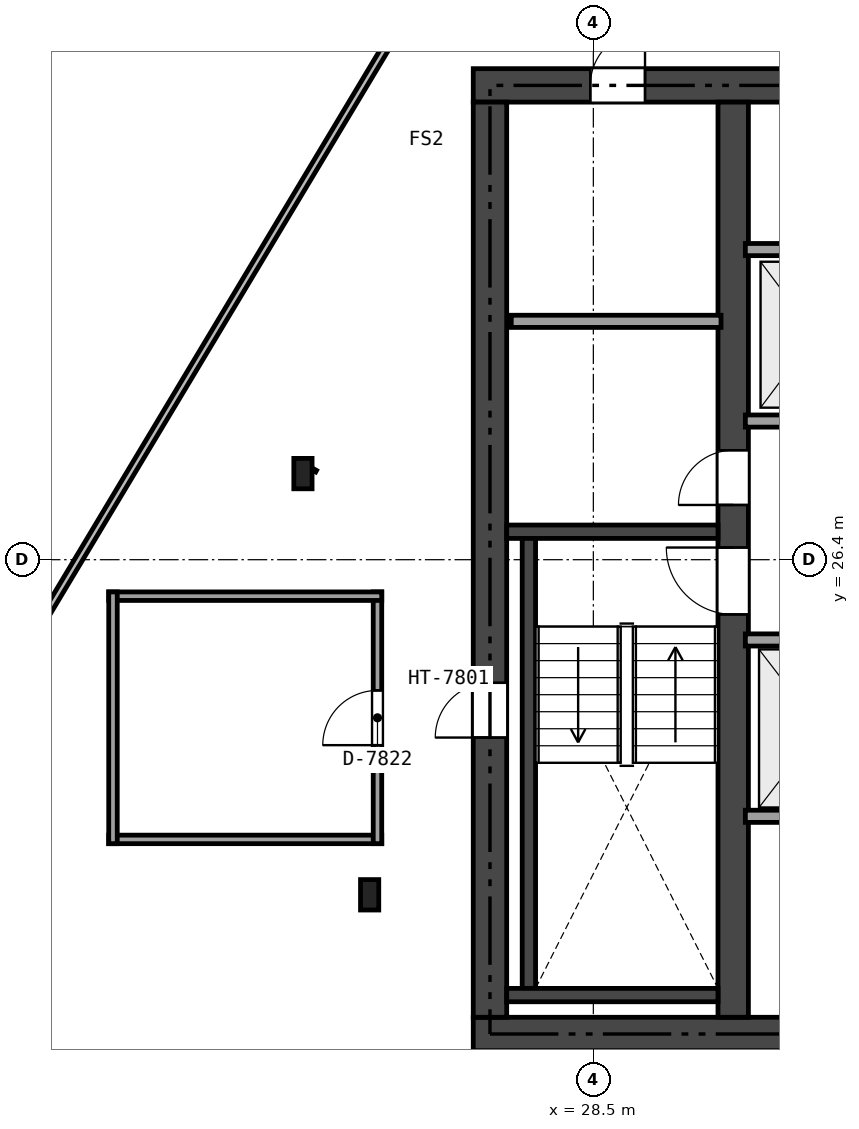
"""IFC4 building model, lengths in metres.
Left out: names, types, materials, properties, quantities, classifications, styles, units other than length and angle.
Written with IfcOpenShell. Run it as: python <this file> out.ifc"""

import sys

from ifc_helpers import new_model, si_unit, direction, frame, frame_2d, origin, origin_2d, place, context, subcontext, project, spatial, rectangle, i_section, extrude, element, fill, save


model = new_model("IFC4")
c1 = context("Model", 3, precision=1e-05, world=origin(), true_north=direction((0.0, 1.0)))
c2 = subcontext(c1, "Body", "Model", "MODEL_VIEW")
j1 = project(units=[si_unit("LENGTHUNIT", "METRE"), si_unit("PLANEANGLEUNIT", "RADIAN")], contexts=[c1])
p1 = place(None, origin())
s1 = spatial("IfcSite", under=j1, at=p1, CompositionType="ELEMENT")
p2 = place(p1, origin())
s2 = spatial("IfcBuilding", under=s1, at=p2, CompositionType="ELEMENT")
p3 = place(p2, frame((0.0, 0.0, 289.9)))
s3 = spatial("IfcBuildingStorey", under=s2, at=p3, CompositionType="ELEMENT", Elevation=289.9)
p4 = place(p3, frame((26.525, 18.6, 0.0), z_axis=(0.0, 0.0, 1.0), x_axis=(1.0, 0.0, 0.0)))
e1 = element("IfcWall", 1, at=p4, inside=s3, PredefinedType="SHEAR", context=c2, shape_type="SweptSolid", body=[
    extrude(rectangle(XDim=21.35, YDim=0.55, at=frame_2d((10.675, 0.0))), origin(), (0.0, 0.0, 1.0), 2.58),
])
p5 = place(p4, frame((12.4, 0.0, 0.0)))
e2 = element("IfcOpeningElement", 2, at=p5, cuts=e1, PredefinedType="OPENING", context=c2, shape_type="SweptSolid", body=[
    extrude(rectangle(XDim=1.15, YDim=2.15, at=frame_2d((0.575, 1.075))), frame((0.0, 0.285, 0.0), z_axis=(0.0, -1.0, 0.0), x_axis=(1.0, 0.0, 0.0)), (0.0, 0.0, 1.0), 0.57),
])
p6 = place(p4, frame((5.225, 0.0, 0.0)))
e3 = element("IfcOpeningElement", 3, at=p6, cuts=e1, PredefinedType="OPENING", context=c2, shape_type="SweptSolid", body=[
    extrude(rectangle(XDim=0.9, YDim=2.1, at=frame_2d((0.45, 1.05))), frame((0.0, 0.285, 0.0), z_axis=(0.0, -1.0, 0.0), x_axis=(1.0, 0.0, 0.0)), (0.0, 0.0, 1.0), 0.57),
])
p7 = place(p3, frame((26.525, 34.2, 0.0), z_axis=(0.0, 0.0, 1.0), x_axis=(1.0, 0.0, 0.0)))
e4 = element("IfcWall", 4, at=p7, inside=s3, PredefinedType="SHEAR", context=c2, shape_type="SweptSolid", body=[
    extrude(rectangle(XDim=21.35, YDim=0.55, at=frame_2d((10.675, 0.0))), origin(), (0.0, 0.0, 1.0), 2.58),
])
p8 = place(p7, frame((9.675, 0.0, 0.0)))
e5 = element("IfcOpeningElement", 5, at=p8, cuts=e4, PredefinedType="OPENING", context=c2, shape_type="SweptSolid", body=[
    extrude(rectangle(XDim=1.1, YDim=2.15, at=frame_2d((0.55, 1.075))), frame((0.0, 0.285, 0.0), z_axis=(0.0, -1.0, 0.0), x_axis=(1.0, 0.0, 0.0)), (0.0, 0.0, 1.0), 0.57),
])
p9 = place(p7, frame((1.925, 0.0, 0.0)))
e6 = element("IfcOpeningElement", 6, at=p9, cuts=e4, PredefinedType="OPENING", context=c2, shape_type="SweptSolid", body=[
    extrude(rectangle(XDim=0.9, YDim=2.1, at=frame_2d((0.45, 1.05))), frame((0.0, 0.285, 0.0), z_axis=(0.0, -1.0, 0.0), x_axis=(1.0, 0.0, 0.0)), (0.0, 0.0, 1.0), 0.57),
])
p10 = place(p7, frame((6.225, 0.0, 0.0)))
e7 = element("IfcOpeningElement", 7, at=p10, cuts=e4, PredefinedType="OPENING", context=c2, shape_type="SweptSolid", body=[
    extrude(rectangle(XDim=0.9, YDim=2.1, at=frame_2d((0.45, 1.05))), frame((0.0, 0.285, 0.0), z_axis=(0.0, -1.0, 0.0), x_axis=(1.0, 0.0, 0.0)), (0.0, 0.0, 1.0), 0.57),
])
p11 = place(p3, frame((26.8, 18.875, 0.0), z_axis=(0.0, 0.0, 1.0), x_axis=(0.0, 1.0, 0.0)))
e8 = element("IfcWall", 8, at=p11, inside=s3, PredefinedType="SHEAR", context=c2, shape_type="SweptSolid", body=[
    extrude(rectangle(XDim=15.05, YDim=0.55, at=frame_2d((7.525, 0.0))), origin(), (0.0, 0.0, 1.0), 2.58),
])
p12 = place(p11, frame((4.6, 0.0, 0.02)))
e9 = element("IfcOpeningElement", 9, at=p12, cuts=e8, PredefinedType="OPENING", context=c2, shape_type="SweptSolid", body=[
    extrude(rectangle(XDim=0.9, YDim=2.02, at=frame_2d((0.45, 1.01))), frame((0.0, 0.285, 0.0), z_axis=(0.0, -1.0, 0.0), x_axis=(1.0, 0.0, 0.0)), (0.0, 0.0, 1.0), 0.57),
])
p13 = place(p3, frame((30.8, 18.875, 0.0), z_axis=(0.0, 0.0, 1.0), x_axis=(0.0, 1.0, 0.0)))
e10 = element("IfcWall", 10, at=p13, inside=s3, PredefinedType="SHEAR", context=c2, shape_type="SweptSolid", body=[
    extrude(rectangle(XDim=15.05, YDim=0.5, at=frame_2d((7.525, 0.0))), origin(), (0.0, 0.0, 1.0), 2.58),
])
p14 = place(p13, frame((6.625, 0.0, 0.0)))
e11 = element("IfcOpeningElement", 11, at=p14, cuts=e10, PredefinedType="OPENING", context=c2, shape_type="SweptSolid", body=[
    extrude(rectangle(XDim=1.1, YDim=2.15, at=frame_2d((0.55, 1.075))), frame((0.0, 0.26, 0.0), z_axis=(0.0, -1.0, 0.0), x_axis=(1.0, 0.0, 0.0)), (0.0, 0.0, 1.0), 0.52),
])
p15 = place(p13, frame((8.425, 0.0, 0.0)))
e12 = element("IfcOpeningElement", 12, at=p15, cuts=e10, PredefinedType="OPENING", context=c2, shape_type="SweptSolid", body=[
    extrude(rectangle(XDim=0.9, YDim=2.1, at=frame_2d((0.45, 1.05))), frame((0.0, 0.26, 0.0), z_axis=(0.0, -1.0, 0.0), x_axis=(1.0, 0.0, 0.0)), (0.0, 0.0, 1.0), 0.52),
])
p16 = place(p3, frame((27.075, 26.86, 0.0), z_axis=(0.0, 0.0, 1.0), x_axis=(1.0, 0.0, 0.0)))
e13 = element("IfcWall", 13, at=p16, inside=s3, PredefinedType="SHEAR", context=c2, shape_type="SweptSolid", body=[
    extrude(rectangle(XDim=3.475, YDim=0.22, at=frame_2d((1.738, 0.0))), origin(), (0.0, 0.0, 1.0), 2.58),
])
p17 = place(p3, frame((27.44, 19.35, 0.0), z_axis=(0.0, 0.0, 1.0), x_axis=(0.0, 1.0, 0.0)))
e14 = element("IfcWall", 14, at=p17, inside=s3, PredefinedType="SHEAR", context=c2, shape_type="SweptSolid", body=[
    extrude(rectangle(XDim=7.4, YDim=0.22, at=frame_2d((3.7, 0.0))), origin(), (0.0, 0.0, 1.0), 2.58),
])
p18 = place(p3, frame((27.075, 19.24, 0.0), z_axis=(0.0, 0.0, 1.0), x_axis=(1.0, 0.0, 0.0)))
e15 = element("IfcWall", 15, at=p18, inside=s3, PredefinedType="SHEAR", context=c2, shape_type="SweptSolid", body=[
    extrude(rectangle(XDim=3.475, YDim=0.22, at=frame_2d((1.738, 0.0))), origin(), (0.0, 0.0, 1.0), 2.58),
])
for number, where, z_axis, x_axis in (
    (16, (23.724, 27.816, 0.0), (0.0, 0.0, 1.0), (1.0, 0.0, 0.0)),
    (17, (24.821, 20.889, 0.0), (0.0, 0.0, 1.0), (1.0, 0.0, 0.0)),
):
    element("IfcColumn", number, at=place(p3, frame(where, z_axis=z_axis, x_axis=x_axis)), inside=s3, PredefinedType="COLUMN", context=c2, shape_type="SweptSolid", body=[
        extrude(i_section(OverallWidth=0.3, OverallDepth=0.5, WebThickness=0.015, FlangeThickness=0.028, at=origin_2d()), origin(), (0.0, 0.0, 1.0), 2.58),
    ])
p19 = place(p3, frame((27.15, 30.32, 0.0), z_axis=(0.0, 0.0, 1.0), x_axis=(1.0, 0.0, 0.0)))
e18 = element("IfcWall", 18, at=p19, inside=s3, PredefinedType="SOLIDWALL", context=c2, shape_type="SweptSolid", body=[
    extrude(rectangle(XDim=3.45, YDim=0.2, at=frame_2d((1.725, 0.0))), origin(), (0.0, 0.0, 1.0), 2.58),
])
p20 = place(p3, frame((31.0, 28.68, 0.0), z_axis=(0.0, 0.0, 1.0), x_axis=(1.0, 0.0, 0.0)))
e19 = element("IfcWall", 19, at=p20, inside=s3, PredefinedType="SOLIDWALL", context=c2, shape_type="SweptSolid", body=[
    extrude(rectangle(XDim=4.42, YDim=0.2, at=frame_2d((2.21, 0.0))), origin(), (0.0, 0.0, 1.0), 2.58),
])
p21 = place(p20, frame((0.6, 0.0, 0.0)))
e20 = element("IfcOpeningElement", 20, at=p21, cuts=e19, PredefinedType="OPENING", context=c2, shape_type="SweptSolid", body=[
    extrude(rectangle(XDim=1.1, YDim=2.15, at=frame_2d((0.55, 1.075))), frame((0.0, 0.11, 0.0), z_axis=(0.0, -1.0, 0.0), x_axis=(1.0, 0.0, 0.0)), (0.0, 0.0, 1.0), 0.22),
])
p22 = place(p20, frame((2.85, 0.0, 0.0)))
e21 = element("IfcOpeningElement", 21, at=p22, cuts=e19, PredefinedType="OPENING", context=c2, shape_type="SweptSolid", body=[
    extrude(rectangle(XDim=1.1, YDim=2.15, at=frame_2d((0.55, 1.075))), frame((0.0, 0.11, 0.0), z_axis=(0.0, -1.0, 0.0), x_axis=(1.0, 0.0, 0.0)), (0.0, 0.0, 1.0), 0.22),
])
p23 = place(p3, frame((31.0, 31.5, 0.0), z_axis=(0.0, 0.0, 1.0), x_axis=(1.0, 0.0, 0.0)))
e22 = element("IfcWall", 22, at=p23, inside=s3, PredefinedType="SOLIDWALL", context=c2, shape_type="SweptSolid", body=[
    extrude(rectangle(XDim=4.42, YDim=0.2, at=frame_2d((2.21, 0.0))), origin(), (0.0, 0.0, 1.0), 2.58),
])
p24 = place(p3, frame((31.0, 25.08, 0.0), z_axis=(0.0, 0.0, 1.0), x_axis=(1.0, 0.0, 0.0)))
e23 = element("IfcWall", 23, at=p24, inside=s3, PredefinedType="SOLIDWALL", context=c2, shape_type="SweptSolid", body=[
    extrude(rectangle(XDim=4.42, YDim=0.2, at=frame_2d((2.21, 0.0))), origin(), (0.0, 0.0, 1.0), 2.58),
])
p25 = place(p24, frame((3.0, 0.0, 0.0)))
e24 = element("IfcOpeningElement", 24, at=p25, cuts=e23, PredefinedType="OPENING", context=c2, shape_type="SweptSolid", body=[
    extrude(rectangle(XDim=0.9, YDim=2.1, at=frame_2d((0.45, 1.05))), frame((0.0, 0.11, 0.0), z_axis=(0.0, -1.0, 0.0), x_axis=(1.0, 0.0, 0.0)), (0.0, 0.0, 1.0), 0.22),
])
p26 = place(p24, frame((0.62, 0.0, 0.0)))
e25 = element("IfcOpeningElement", 25, at=p26, cuts=e23, PredefinedType="OPENING", context=c2, shape_type="SweptSolid", body=[
    extrude(rectangle(XDim=1.2, YDim=2.15, at=frame_2d((0.6, 1.075))), frame((0.0, 0.11, 0.0), z_axis=(0.0, -1.0, 0.0), x_axis=(1.0, 0.0, 0.0)), (0.0, 0.0, 1.0), 0.22),
])
p27 = place(p3, frame((31.0, 22.18, 0.0), z_axis=(0.0, 0.0, 1.0), x_axis=(1.0, 0.0, 0.0)))
e26 = element("IfcWall", 26, at=p27, inside=s3, PredefinedType="SOLIDWALL", context=c2, shape_type="SweptSolid", body=[
    extrude(rectangle(XDim=2.42, YDim=0.2, at=frame_2d((1.21, 0.0))), origin(), (0.0, 0.0, 1.0), 2.58),
])
p28 = place(p3, frame((20.53, 21.8, 0.0), z_axis=(0.0, 0.0, 1.0), x_axis=(1.0, 0.0, 0.0)))
e27 = element("IfcWall", 27, at=p28, inside=s3, PredefinedType="PARTITIONING", context=c2, shape_type="SweptSolid", body=[
    extrude(rectangle(XDim=4.49, YDim=0.14, at=frame_2d((2.245, 0.0))), origin(), (0.0, 0.0, 1.0), 1.665),
])
p29 = place(p3, frame((24.95, 21.73, 0.0), z_axis=(0.0, 0.0, 1.0), x_axis=(0.0, 1.0, 0.0)))
e28 = element("IfcWall", 28, at=p29, inside=s3, PredefinedType="PARTITIONING", context=c2, shape_type="SweptSolid", body=[
    extrude(rectangle(XDim=4.14, YDim=0.14, at=frame_2d((2.07, 0.0))), origin(), (0.0, 0.0, 1.0), 2.58),
])
p30 = place(p29, frame((1.62, 0.0, 0.0)))
e29 = element("IfcOpeningElement", 29, at=p30, cuts=e28, PredefinedType="OPENING", context=c2, shape_type="SweptSolid", body=[
    extrude(rectangle(XDim=0.9, YDim=2.0, at=frame_2d((0.45, 1.0))), frame((0.0, 0.08, 0.0), z_axis=(0.0, -1.0, 0.0), x_axis=(1.0, 0.0, 0.0)), (0.0, 0.0, 1.0), 0.16),
])
p31 = place(p3, frame((25.02, 25.8, 0.0), z_axis=(0.0, 0.0, 1.0), x_axis=(-1.0, 0.0, 0.0)))
e30 = element("IfcWall", 30, at=p31, inside=s3, PredefinedType="PARTITIONING", context=c2, shape_type="SweptSolid", body=[
    extrude(rectangle(XDim=4.49, YDim=0.14, at=frame_2d((2.245, 0.0))), origin(), (0.0, 0.0, 1.0), 1.665),
])
p32 = place(p3, frame((20.6, 25.87, 0.0), z_axis=(0.0, 0.0, 1.0), x_axis=(0.0, -1.0, 0.0)))
e31 = element("IfcWall", 31, at=p32, inside=s3, PredefinedType="PARTITIONING", context=c2, shape_type="SweptSolid", body=[
    extrude(rectangle(XDim=4.14, YDim=0.14, at=frame_2d((2.07, 0.0))), origin(), (0.0, 0.0, 1.0), 2.58),
])
p33 = place(p12, origin())
e32 = element("IfcDoor", 32, at=p33, inside=s3, OperationType="SINGLE_SWING_LEFT", PredefinedType="TRAPDOOR", context=c2, shape_type="SweptSolid", body=[
    extrude(rectangle(XDim=0.9, YDim=2.02, at=frame_2d((0.45, 1.01))), frame((0.0, 0.025, 0.0), z_axis=(0.0, -1.0, 0.0), x_axis=(1.0, 0.0, 0.0)), (0.0, 0.0, 1.0), 0.05),
])
fill(e9, e32)
p34 = place(p14, origin())
e33 = element("IfcDoor", 33, at=p34, inside=s3, OperationType="SINGLE_SWING_RIGHT", PredefinedType="DOOR", context=c2, shape_type="SweptSolid", body=[
    extrude(rectangle(XDim=1.1, YDim=2.15, at=frame_2d((0.55, 1.075))), frame((0.0, 0.025, 0.0), z_axis=(0.0, -1.0, 0.0), x_axis=(1.0, 0.0, 0.0)), (0.0, 0.0, 1.0), 0.05),
])
fill(e11, e33)
p35 = place(p15, origin())
e34 = element("IfcDoor", 34, at=p35, inside=s3, OperationType="SINGLE_SWING_LEFT", PredefinedType="DOOR", context=c2, shape_type="SweptSolid", body=[
    extrude(rectangle(XDim=0.9, YDim=2.1, at=frame_2d((0.45, 1.05))), frame((0.0, 0.025, 0.0), z_axis=(0.0, -1.0, 0.0), x_axis=(1.0, 0.0, 0.0)), (0.0, 0.0, 1.0), 0.05),
])
fill(e12, e34)
p36 = place(p9, origin())
e35 = element("IfcDoor", 35, at=p36, inside=s3, OperationType="SINGLE_SWING_RIGHT", PredefinedType="DOOR", context=c2, shape_type="SweptSolid", body=[
    extrude(rectangle(XDim=0.9, YDim=2.1, at=frame_2d((0.45, 1.05))), frame((0.0, 0.025, 0.0), z_axis=(0.0, -1.0, 0.0), x_axis=(1.0, 0.0, 0.0)), (0.0, 0.0, 1.0), 0.05),
])
fill(e6, e35)
p37 = place(p30, origin())
e36 = element("IfcDoor", 36, at=p37, inside=s3, OperationType="SINGLE_SWING_LEFT", PredefinedType="DOOR", context=c2, shape_type="SweptSolid", body=[
    extrude(rectangle(XDim=0.9, YDim=2.0, at=frame_2d((0.45, 1.0))), frame((0.0, 0.025, 0.0), z_axis=(0.0, -1.0, 0.0), x_axis=(1.0, 0.0, 0.0)), (0.0, 0.0, 1.0), 0.05),
])
fill(e29, e36)
save(model, sys.argv[1])
